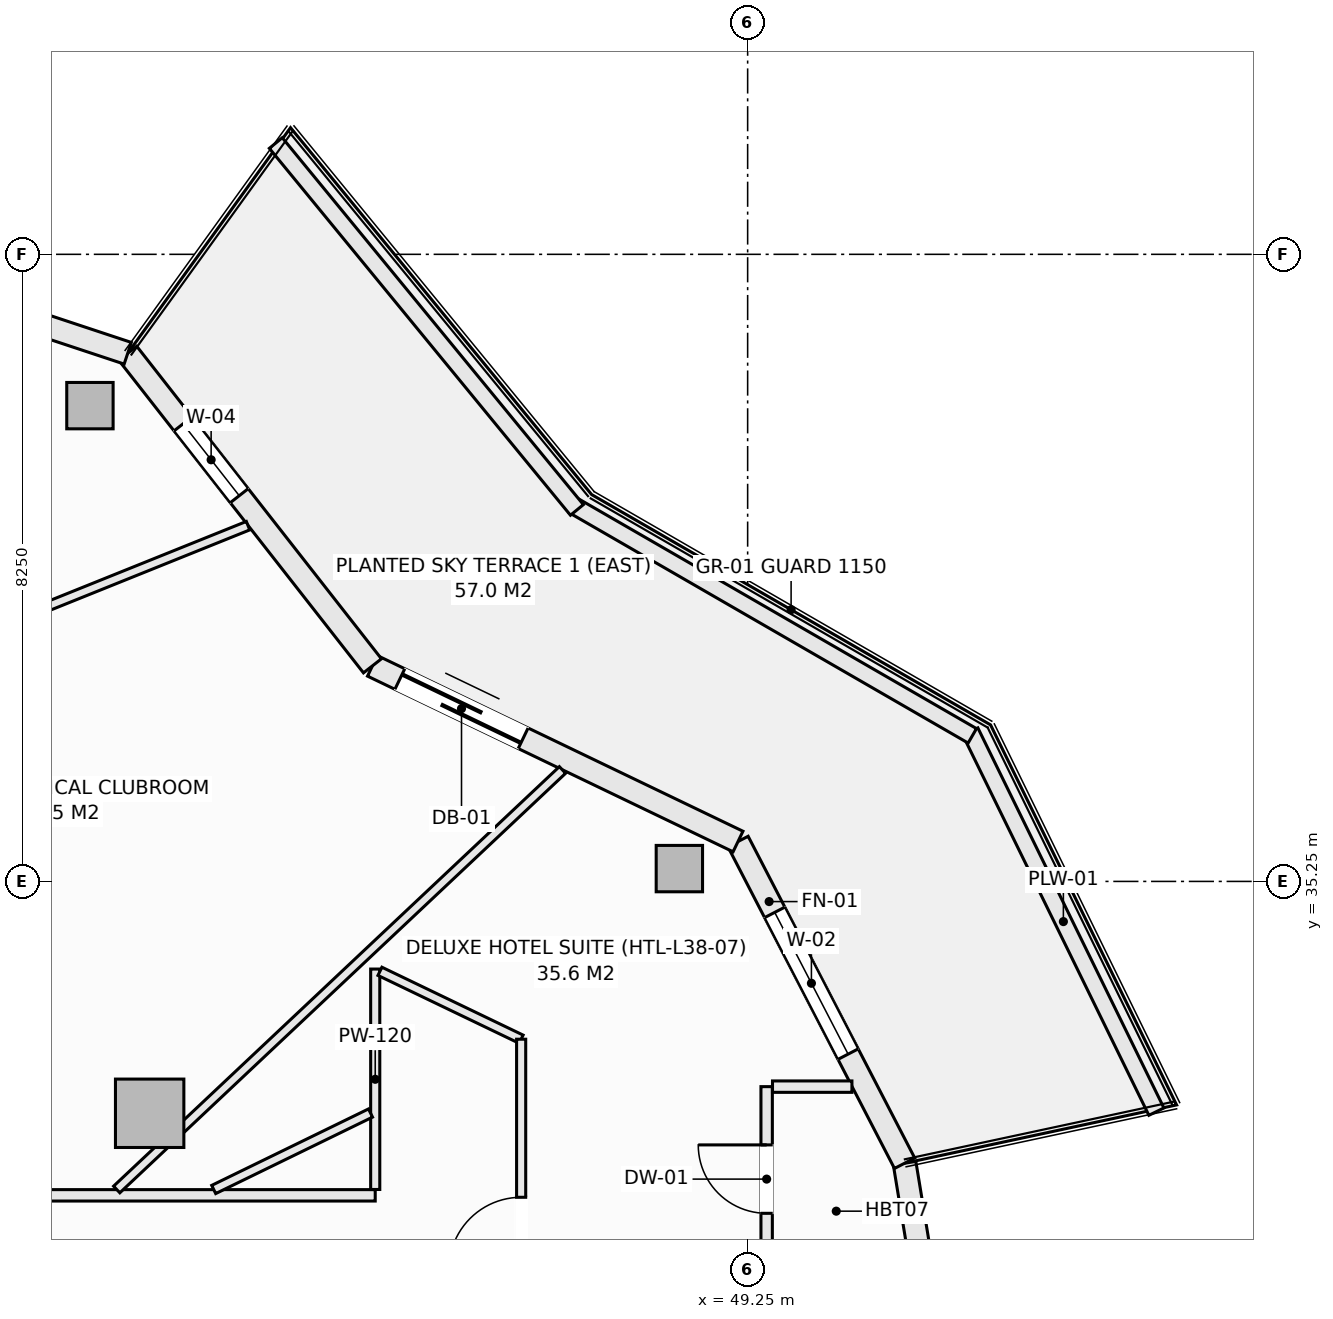
"""IFC4 building model, lengths in metres.
Left out: names, types, materials, properties, quantities, classifications, styles, units other than length and angle.
Written with IfcOpenShell. Run it as: python <this file> out.ifc"""

import sys

from ifc_helpers import new_model, si_unit, direction, frame, frame_2d, origin, origin_2d, place, context, subcontext, project, spatial, rectangle, hollow_rectangle, extrude, element, fill, save


model = new_model("IFC4")
c1 = context("Model", 3, precision=1e-05, world=origin(), true_north=direction((0.0, 1.0)))
c2 = subcontext(c1, "Body", "Model", "MODEL_VIEW")
j1 = project(units=[si_unit("LENGTHUNIT", "METRE"), si_unit("PLANEANGLEUNIT", "RADIAN")], contexts=[c1])
p1 = place(None, origin())
s1 = spatial("IfcSite", under=j1, at=p1, CompositionType="ELEMENT")
p2 = place(p1, origin())
s2 = spatial("IfcBuilding", under=s1, at=p2, CompositionType="ELEMENT")
p3 = place(p2, frame((0.0, 0.0, 149.5)))
s3 = spatial("IfcBuildingStorey", under=s2, at=p3, CompositionType="ELEMENT", Elevation=149.5)
for number, where, z_axis, x_axis in (
    (1, (48.352, 35.419, -0.27), (0.0, 0.0, 1.0), (1.0, 0.0, 0.0)),
    (2, (40.596, 41.51, -0.27), (0.0, 0.0, 1.0), (1.0, 0.0, 0.0)),
):
    element("IfcColumn", number, at=place(p3, frame(where, z_axis=z_axis, x_axis=x_axis)), inside=s3, PredefinedType="COLUMN", context=c2, shape_type="SweptSolid", body=[
        extrude(hollow_rectangle(XDim=0.61, YDim=0.61, WallThickness=0.025, at=origin_2d()), origin(), (0.0, 0.0, 1.0), 3.4),
    ])
p4 = place(p3, frame((41.382, 32.199, -0.27), z_axis=(0.0, 0.0, 1.0), x_axis=(1.0, 0.0, 0.0)))
e3 = element("IfcColumn", 3, at=p4, inside=s3, PredefinedType="COLUMN", context=c2, shape_type="SweptSolid", body=[
    extrude(rectangle(XDim=0.9, YDim=0.9, at=origin_2d()), origin(), (0.0, 0.0, 1.0), 3.4),
])
p5 = place(p3, frame((51.315, 31.542, 0.0), z_axis=(0.0, 0.0, 1.0), x_axis=(0.162394765401, -0.986725868806, 0.0)))
e4 = element("IfcWall", 4, at=p5, inside=s3, PredefinedType="SOLIDWALL", context=c2, shape_type="SweptSolid", body=[
    extrude(rectangle(XDim=4.603, YDim=0.3, at=frame_2d((2.302, 0.0))), origin(), (0.0, 0.0, 1.0), 2.653),
])
p6 = place(p3, frame((49.123, 35.775, 0.0), z_axis=(0.0, 0.0, 1.0), x_axis=(0.459810251451, -0.888017191647, 0.0)))
e5 = element("IfcWall", 5, at=p6, inside=s3, PredefinedType="SOLIDWALL", context=c2, shape_type="SweptSolid", body=[
    extrude(rectangle(XDim=4.766, YDim=0.3, at=frame_2d((2.383, 0.0))), origin(), (0.0, 0.0, 1.0), 2.653),
])
p7 = place(p6, frame((1.05, 0.0, 0.74)))
e6 = element("IfcOpeningElement", 6, at=p7, cuts=e5, PredefinedType="OPENING", context=c2, shape_type="SweptSolid", body=[
    extrude(rectangle(XDim=2.1, YDim=1.7, at=frame_2d((1.05, 0.85))), frame((0.0, 0.16, 0.0), z_axis=(0.0, -1.0, 0.0), x_axis=(1.0, 0.0, 0.0)), (0.0, 0.0, 1.0), 0.32),
])
p8 = place(p3, frame((44.313, 38.086, 0.0), z_axis=(0.0, 0.0, 1.0), x_axis=(0.901353070301, -0.433085029363, 0.0)))
e7 = element("IfcWall", 7, at=p8, inside=s3, PredefinedType="SOLIDWALL", context=c2, shape_type="SweptSolid", body=[
    extrude(rectangle(XDim=5.336, YDim=0.3, at=frame_2d((2.668, 0.0))), origin(), (0.0, 0.0, 1.0), 2.653),
])
p9 = place(p8, frame((0.4, 0.0, 0.0)))
e8 = element("IfcOpeningElement", 8, at=p9, cuts=e7, PredefinedType="OPENING", context=c2, shape_type="SweptSolid", body=[
    extrude(rectangle(XDim=1.8, YDim=2.25, at=frame_2d((0.9, 1.125))), frame((0.0, 0.16, 0.0), z_axis=(0.0, -1.0, 0.0), x_axis=(1.0, 0.0, 0.0)), (0.0, 0.0, 1.0), 0.32),
])
p10 = place(p3, frame((41.094, 42.199, 0.0), z_axis=(0.0, 0.0, 1.0), x_axis=(0.616429245738, -0.787410302828, 0.0)))
e9 = element("IfcWall", 9, at=p10, inside=s3, PredefinedType="SOLIDWALL", context=c2, shape_type="SweptSolid", body=[
    extrude(rectangle(XDim=5.223, YDim=0.3, at=frame_2d((2.612, 0.0))), origin(), (0.0, 0.0, 1.0), 2.653),
])
p11 = place(p10, frame((1.18, 0.0, 0.72)))
e10 = element("IfcOpeningElement", 10, at=p11, cuts=e9, PredefinedType="OPENING", context=c2, shape_type="SweptSolid", body=[
    extrude(rectangle(XDim=1.2, YDim=1.65, at=frame_2d((0.6, 0.825))), frame((0.0, 0.16, 0.0), z_axis=(0.0, -1.0, 0.0), x_axis=(1.0, 0.0, 0.0)), (0.0, 0.0, 1.0), 0.32),
])
p12 = place(p3, frame((35.803, 43.952, 0.0), z_axis=(0.0, 0.0, 1.0), x_axis=(0.949246811547, -0.314532177636, 0.0)))
e11 = element("IfcWall", 11, at=p12, inside=s3, PredefinedType="SOLIDWALL", context=c2, shape_type="SweptSolid", body=[
    extrude(rectangle(XDim=5.574, YDim=0.3, at=frame_2d((2.787, 0.0))), origin(), (0.0, 0.0, 1.0), 2.653),
])
p13 = place(p12, frame((2.38, 0.0, 0.72)))
e12 = element("IfcOpeningElement", 12, at=p13, cuts=e11, PredefinedType="OPENING", context=c2, shape_type="SweptSolid", body=[
    extrude(rectangle(XDim=1.2, YDim=1.65, at=frame_2d((0.6, 0.825))), frame((0.0, 0.16, 0.0), z_axis=(0.0, -1.0, 0.0), x_axis=(1.0, 0.0, 0.0)), (0.0, 0.0, 1.0), 0.32),
])
p14 = place(p3, frame((52.18, 37.221, 0.0), z_axis=(0.0, 0.0, 1.0), x_axis=(0.439637174641, -0.898175458735, 0.0)))
e13 = element("IfcWall", 13, at=p14, inside=s3, PredefinedType="PARAPET", context=c2, shape_type="SweptSolid", body=[
    extrude(rectangle(XDim=5.567, YDim=0.22, at=frame_2d((2.784, 0.0))), origin(), (0.0, 0.0, 1.0), 0.52),
])
p15 = place(p3, frame((46.958, 40.195, 0.0), z_axis=(0.0, 0.0, 1.0), x_axis=(0.866058128659, -0.499943314571, 0.0)))
e14 = element("IfcWall", 14, at=p15, inside=s3, PredefinedType="PARAPET", context=c2, shape_type="SweptSolid", body=[
    extrude(rectangle(XDim=6.06, YDim=0.22, at=frame_2d((3.03, 0.0))), origin(), (0.0, 0.0, 1.0), 0.52),
])
p16 = place(p3, frame((43.042, 44.964, 0.0), z_axis=(0.0, 0.0, 1.0), x_axis=(0.634429234628, -0.77298094818, 0.0)))
e15 = element("IfcWall", 15, at=p16, inside=s3, PredefinedType="PARAPET", context=c2, shape_type="SweptSolid", body=[
    extrude(rectangle(XDim=6.245, YDim=0.22, at=frame_2d((3.123, 0.0))), origin(), (0.0, 0.0, 1.0), 0.52),
])
p17 = place(p3, frame((38.862, 31.12, 0.0), z_axis=(0.0, 0.0, 1.0), x_axis=(1.0, 0.0, 0.0)))
e16 = element("IfcWall", 16, at=p17, inside=s3, PredefinedType="PARTITIONING", context=c2, shape_type="SweptSolid", body=[
    extrude(rectangle(XDim=5.488, YDim=0.15, at=frame_2d((2.744, 0.0))), origin(), (0.0, 0.0, 1.0), 3.13),
])
p18 = place(p3, frame((44.35, 31.197, 0.0), z_axis=(0.0, 0.0, 1.0), x_axis=(0.0, 1.0, 0.0)))
e17 = element("IfcWall", 17, at=p18, inside=s3, PredefinedType="PARTITIONING", context=c2, shape_type="SweptSolid", body=[
    extrude(rectangle(XDim=2.9, YDim=0.12, at=frame_2d((1.45, 0.0))), origin(), (0.0, 0.0, 1.0), 3.13),
])
p19 = place(p3, frame((44.412, 34.067, 0.0), z_axis=(0.0, 0.0, 1.0), x_axis=(0.90128266231, -0.433231534656, 0.0)))
e18 = element("IfcWall", 18, at=p19, inside=s3, PredefinedType="PARTITIONING", context=c2, shape_type="SweptSolid", body=[
    extrude(rectangle(XDim=2.062, YDim=0.12, at=frame_2d((1.031, 0.0))), origin(), (0.0, 0.0, 1.0), 3.13),
])
p20 = place(p3, frame((46.27, 20.826, 0.0), z_axis=(0.0, 0.0, 1.0), x_axis=(0.0, 1.0, 0.0)))
e19 = element("IfcWall", 19, at=p20, inside=s3, PredefinedType="PARTITIONING", context=c2, shape_type="SweptSolid", body=[
    extrude(rectangle(XDim=12.348, YDim=0.12, at=frame_2d((6.174, 0.0))), origin(), (0.0, 0.0, 1.0), 3.13),
])
p21 = place(p20, frame((3.556, 0.0, 0.0)))
e20 = element("IfcOpeningElement", 20, at=p21, cuts=e19, PredefinedType="OPENING", context=c2, shape_type="SweptSolid", body=[
    extrude(rectangle(XDim=0.95, YDim=2.1, at=frame_2d((0.475, 1.05))), frame((0.0, 0.07, 0.0), z_axis=(0.0, -1.0, 0.0), x_axis=(1.0, 0.0, 0.0)), (0.0, 0.0, 1.0), 0.14),
])
p22 = place(p20, frame((9.318, 0.0, 0.0)))
e21 = element("IfcOpeningElement", 21, at=p22, cuts=e19, PredefinedType="OPENING", context=c2, shape_type="SweptSolid", body=[
    extrude(rectangle(XDim=0.95, YDim=2.1, at=frame_2d((0.475, 1.05))), frame((0.0, 0.07, 0.0), z_axis=(0.0, -1.0, 0.0), x_axis=(1.0, 0.0, 0.0)), (0.0, 0.0, 1.0), 0.14),
])
p23 = place(p3, frame((49.5, 30.117, 0.0), z_axis=(0.0, 0.0, 1.0), x_axis=(0.0, 1.0, 0.0)))
e22 = element("IfcWall", 22, at=p23, inside=s3, PredefinedType="PARTITIONING", context=c2, shape_type="SweptSolid", body=[
    extrude(rectangle(XDim=2.433, YDim=0.15, at=frame_2d((1.217, 0.0))), origin(), (0.0, 0.0, 1.0), 2.653),
])
p24 = place(p23, frame((0.767, 0.0, 0.0)))
e23 = element("IfcOpeningElement", 23, at=p24, cuts=e22, PredefinedType="OPENING", context=c2, shape_type="SweptSolid", body=[
    extrude(rectangle(XDim=0.9, YDim=2.1, at=frame_2d((0.45, 1.05))), frame((0.0, 0.085, 0.0), z_axis=(0.0, -1.0, 0.0), x_axis=(1.0, 0.0, 0.0)), (0.0, 0.0, 1.0), 0.17),
])
p25 = place(p3, frame((49.577, 32.55, 0.0), z_axis=(0.0, 0.0, 1.0), x_axis=(1.0, 0.0, 0.0)))
e24 = element("IfcWall", 24, at=p25, inside=s3, PredefinedType="PARTITIONING", context=c2, shape_type="SweptSolid", body=[
    extrude(rectangle(XDim=1.045, YDim=0.15, at=frame_2d((0.522, 0.0))), origin(), (0.0, 0.0, 1.0), 3.13),
])
p26 = place(p3, frame((42.225, 31.197, 0.0), z_axis=(0.0, 0.0, 1.0), x_axis=(0.898870643835, 0.438214063732, 0.0)))
e25 = element("IfcWall", 25, at=p26, inside=s3, PredefinedType="PARTITIONING", context=c2, shape_type="SweptSolid", body=[
    extrude(rectangle(XDim=2.295, YDim=0.12, at=frame_2d((1.148, 0.0))), origin(), (0.0, 0.0, 1.0), 3.13),
])
p27 = place(p3, frame((40.949, 31.197, 0.0), z_axis=(0.0, 0.0, 1.0), x_axis=(0.728258728927, 0.685302286397, 0.0)))
e26 = element("IfcWall", 26, at=p27, inside=s3, PredefinedType="PARTITIONING", context=c2, shape_type="SweptSolid", body=[
    extrude(rectangle(XDim=8.053, YDim=0.12, at=frame_2d((4.027, 0.0))), origin(), (0.0, 0.0, 1.0), 2.812),
])
p28 = place(p3, frame((34.112, 36.482, 0.0), z_axis=(0.0, 0.0, 1.0), x_axis=(0.92763911586, 0.373477804863, 0.0)))
e27 = element("IfcWall", 27, at=p28, inside=s3, PredefinedType="PARTITIONING", context=c2, shape_type="SweptSolid", body=[
    extrude(rectangle(XDim=9.233, YDim=0.12, at=frame_2d((4.616, 0.0))), origin(), (0.0, 0.0, 1.0), 2.505),
])
p29 = place(p7, origin())
e28 = element("IfcWindow", 28, at=p29, inside=s3, PartitioningType="SINGLE_PANEL", PredefinedType="WINDOW", context=c2, shape_type="SweptSolid", body=[
    extrude(rectangle(XDim=2.1, YDim=1.7, at=frame_2d((1.05, 0.85))), frame((0.0, 0.03, 0.0), z_axis=(0.0, -1.0, 0.0), x_axis=(1.0, 0.0, 0.0)), (0.0, 0.0, 1.0), 0.06),
])
fill(e6, e28)
p30 = place(p9, origin())
e29 = element("IfcDoor", 29, at=p30, inside=s3, OperationType="SLIDING_TO_LEFT", PredefinedType="DOOR", context=c2, shape_type="SweptSolid", body=[
    extrude(rectangle(XDim=1.8, YDim=2.25, at=frame_2d((0.9, 1.125))), frame((0.0, 0.025, 0.0), z_axis=(0.0, -1.0, 0.0), x_axis=(1.0, 0.0, 0.0)), (0.0, 0.0, 1.0), 0.05),
])
fill(e8, e29)
p31 = place(p11, origin())
e30 = element("IfcWindow", 30, at=p31, inside=s3, PartitioningType="SINGLE_PANEL", PredefinedType="WINDOW", context=c2, shape_type="SweptSolid", body=[
    extrude(rectangle(XDim=1.2, YDim=1.65, at=frame_2d((0.6, 0.825))), frame((0.0, 0.03, 0.0), z_axis=(0.0, -1.0, 0.0), x_axis=(1.0, 0.0, 0.0)), (0.0, 0.0, 1.0), 0.06),
])
fill(e10, e30)
p32 = place(p22, origin())
e31 = element("IfcDoor", 31, at=p32, inside=s3, OperationType="SINGLE_SWING_LEFT", PredefinedType="DOOR", context=c2, shape_type="SweptSolid", body=[
    extrude(rectangle(XDim=0.95, YDim=2.1, at=frame_2d((0.475, 1.05))), frame((0.0, 0.025, 0.0), z_axis=(0.0, -1.0, 0.0), x_axis=(1.0, 0.0, 0.0)), (0.0, 0.0, 1.0), 0.05),
])
fill(e21, e31)
p33 = place(p24, origin())
e32 = element("IfcDoor", 32, at=p33, inside=s3, OperationType="SINGLE_SWING_RIGHT", PredefinedType="DOOR", context=c2, shape_type="SweptSolid", body=[
    extrude(rectangle(XDim=0.9, YDim=2.1, at=frame_2d((0.45, 1.05))), frame((0.0, 0.025, 0.0), z_axis=(0.0, -1.0, 0.0), x_axis=(1.0, 0.0, 0.0)), (0.0, 0.0, 1.0), 0.05),
])
fill(e23, e32)
save(model, sys.argv[1])
